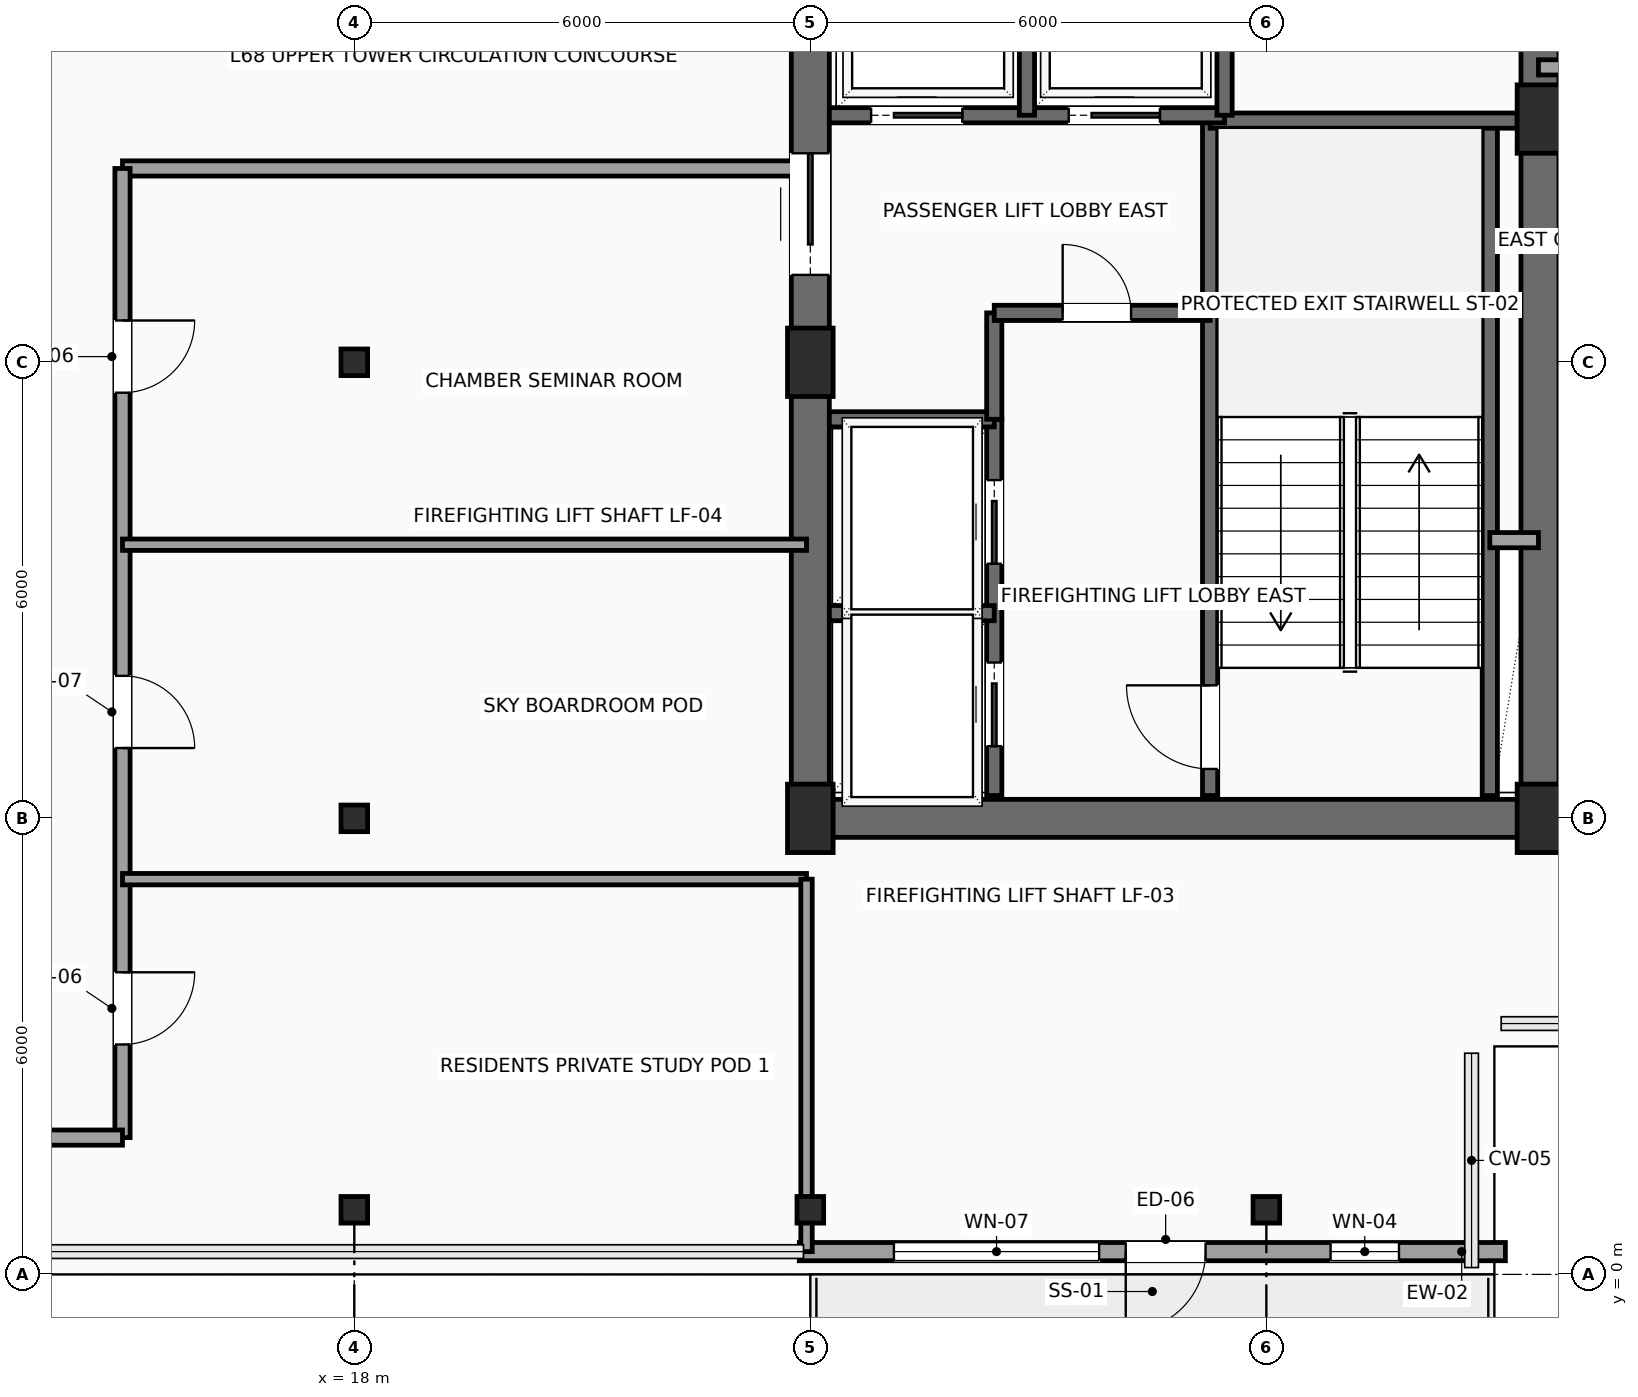
"""IFC4 building model, lengths in metres.
Left out: names, types, materials, properties, quantities, classifications, styles, units other than length and angle.
Written with IfcOpenShell. Run it as: python <this file> out.ifc"""

import sys

from ifc_helpers import new_model, si_unit, direction, frame, frame_2d, origin, origin_2d, place, context, subcontext, project, spatial, rectangle, hollow_rectangle, extrude, element, fill, save


model = new_model("IFC4")
c1 = context("Model", 3, precision=1e-05, world=origin(), true_north=direction((0.0, 1.0)))
c2 = subcontext(c1, "Body", "Model", "MODEL_VIEW")
j1 = project(units=[si_unit("LENGTHUNIT", "METRE"), si_unit("PLANEANGLEUNIT", "RADIAN")], contexts=[c1])
p1 = place(None, origin())
s1 = spatial("IfcSite", under=j1, at=p1, CompositionType="ELEMENT")
p2 = place(p1, origin())
s2 = spatial("IfcBuilding", under=s1, at=p2, CompositionType="ELEMENT")
p3 = place(p2, frame((0.0, 0.0, 271.2)))
s3 = spatial("IfcBuildingStorey", under=s2, at=p3, CompositionType="ELEMENT", Elevation=271.2)
for number, where, z_axis, x_axis in (
    (1, (24.0, 6.0, 0.0), (0.0, 0.0, 1.0), (1.0, 0.0, 0.0)),
    (2, (24.0, 12.0, 0.0), (0.0, 0.0, 1.0), (1.0, 0.0, 0.0)),
    (3, (33.6, 6.0, 0.0), (0.0, 0.0, 1.0), (1.0, 0.0, 0.0)),
    (4, (33.6, 15.2, 0.0), (0.0, 0.0, 1.0), (1.0, 0.0, 0.0)),
):
    element("IfcColumn", number, at=place(p3, frame(where, z_axis=z_axis, x_axis=x_axis)), inside=s3, PredefinedType="COLUMN", context=c2, shape_type="SweptSolid", body=[
        extrude(rectangle(XDim=0.6, YDim=0.9, at=origin_2d()), origin(), (0.0, 0.0, 1.0), 3.5),
    ])
for number, where, z_axis, x_axis in (
    (5, (18.0, 0.85, 0.0), (0.0, 0.0, 1.0), (1.0, 0.0, 0.0)),
    (6, (18.0, 6.0, 0.0), (0.0, 0.0, 1.0), (1.0, 0.0, 0.0)),
    (7, (18.0, 12.0, 0.0), (0.0, 0.0, 1.0), (1.0, 0.0, 0.0)),
    (8, (24.0, 0.85, 0.0), (0.0, 0.0, 1.0), (1.0, 0.0, 0.0)),
    (9, (30.0, 0.85, 0.0), (0.0, 0.0, 1.0), (1.0, 0.0, 0.0)),
):
    element("IfcColumn", number, at=place(p3, frame(where, z_axis=z_axis, x_axis=x_axis)), inside=s3, PredefinedType="COLUMN", context=c2, shape_type="SweptSolid", body=[
        extrude(hollow_rectangle(XDim=0.35, YDim=0.35, WallThickness=0.016, InnerFilletRadius=0.016, OuterFilletRadius=0.032, at=origin_2d()), origin(), (0.0, 0.0, 1.0), 3.5),
    ])
p4 = place(p3, frame((33.145, 0.3, 0.0), z_axis=(0.0, 0.0, 1.0), x_axis=(-1.0, 0.0, 0.0)))
e10 = element("IfcWall", 10, at=p4, inside=s3, PredefinedType="SOLIDWALL", context=c2, shape_type="SweptSolid", body=[
    extrude(rectangle(XDim=9.29, YDim=0.24, at=frame_2d((4.645, 0.0))), origin(), (0.0, 0.0, 1.0), 3.3),
])
p5 = place(p4, frame((3.945, 0.0, 0.0)))
e11 = element("IfcOpeningElement", 11, at=p5, cuts=e10, PredefinedType="OPENING", context=c2, shape_type="SweptSolid", body=[
    extrude(rectangle(XDim=1.05, YDim=2.2, at=frame_2d((0.525, 1.1))), frame((0.0, 0.13, 0.0), z_axis=(0.0, -1.0, 0.0), x_axis=(1.0, 0.0, 0.0)), (0.0, 0.0, 1.0), 0.26),
])
p6 = place(p4, frame((5.345, 0.0, 0.6)))
e12 = element("IfcOpeningElement", 12, at=p6, cuts=e10, PredefinedType="OPENING", context=c2, shape_type="SweptSolid", body=[
    extrude(rectangle(XDim=2.7, YDim=2.3, at=frame_2d((1.35, 1.15))), frame((0.0, 0.13, 0.0), z_axis=(0.0, -1.0, 0.0), x_axis=(1.0, 0.0, 0.0)), (0.0, 0.0, 1.0), 0.26),
])
p7 = place(p4, frame((1.4, 0.0, 0.6)))
e13 = element("IfcOpeningElement", 13, at=p7, cuts=e10, PredefinedType="OPENING", context=c2, shape_type="SweptSolid", body=[
    extrude(rectangle(XDim=0.9, YDim=2.2, at=frame_2d((0.45, 1.1))), frame((0.0, 0.13, 0.0), z_axis=(0.0, -1.0, 0.0), x_axis=(1.0, 0.0, 0.0)), (0.0, 0.0, 1.0), 0.26),
])
p8 = place(p3, frame((24.0, 6.0, 0.0), z_axis=(0.0, 0.0, 1.0), x_axis=(1.0, 0.0, 0.0)))
e14 = element("IfcWall", 14, at=p8, inside=s3, PredefinedType="SHEAR", context=c2, shape_type="SweptSolid", body=[
    extrude(rectangle(XDim=9.6, YDim=0.5, at=frame_2d((4.8, 0.0))), origin(), (0.0, 0.0, 1.0), 3.3),
])
p9 = place(p3, frame((24.0, 6.0, 0.0), z_axis=(0.0, 0.0, 1.0), x_axis=(0.0, 1.0, 0.0)))
e15 = element("IfcWall", 15, at=p9, inside=s3, PredefinedType="SHEAR", context=c2, shape_type="SweptSolid", body=[
    extrude(rectangle(XDim=12.0, YDim=0.5, at=frame_2d((6.0, 0.0))), origin(), (0.0, 0.0, 1.0), 3.3),
])
p10 = place(p9, frame((7.15, 0.0, 0.0)))
e16 = element("IfcOpeningElement", 16, at=p10, cuts=e15, PredefinedType="OPENING", context=c2, shape_type="SweptSolid", body=[
    extrude(rectangle(XDim=1.6, YDim=2.3, at=frame_2d((0.8, 1.15))), frame((0.0, 0.26, 0.0), z_axis=(0.0, -1.0, 0.0), x_axis=(1.0, 0.0, 0.0)), (0.0, 0.0, 1.0), 0.52),
])
p11 = place(p3, frame((33.6, 6.0, 0.0), z_axis=(0.0, 0.0, 1.0), x_axis=(0.0, 1.0, 0.0)))
e17 = element("IfcWall", 17, at=p11, inside=s3, PredefinedType="SHEAR", context=c2, shape_type="SweptSolid", body=[
    extrude(rectangle(XDim=12.0, YDim=0.5, at=frame_2d((6.0, 0.0))), origin(), (0.0, 0.0, 1.0), 3.3),
])
p12 = place(p11, frame((10.3, 0.0, 0.0)))
e18 = element("IfcOpeningElement", 18, at=p12, cuts=e17, PredefinedType="OPENING", context=c2, shape_type="SweptSolid", body=[
    extrude(rectangle(XDim=0.9, YDim=2.15, at=frame_2d((0.45, 1.075))), frame((0.0, 0.26, 0.0), z_axis=(0.0, -1.0, 0.0), x_axis=(1.0, 0.0, 0.0)), (0.0, 0.0, 1.0), 0.52),
])
p13 = place(p3, frame((29.26, 6.3, 0.0), z_axis=(0.0, 0.0, 1.0), x_axis=(0.0, 1.0, 0.0)))
e19 = element("IfcWall", 19, at=p13, inside=s3, PredefinedType="SHEAR", context=c2, shape_type="SweptSolid", body=[
    extrude(rectangle(XDim=8.88, YDim=0.2, at=frame_2d((4.44, 0.0))), origin(), (0.0, 0.0, 1.0), 3.3),
])
p14 = place(p13, frame((0.35, 0.0, 0.0)))
e20 = element("IfcOpeningElement", 20, at=p14, cuts=e19, PredefinedType="OPENING", context=c2, shape_type="SweptSolid", body=[
    extrude(rectangle(XDim=1.1, YDim=2.2, at=frame_2d((0.55, 1.1))), frame((0.0, 0.11, 0.0), z_axis=(0.0, -1.0, 0.0), x_axis=(1.0, 0.0, 0.0)), (0.0, 0.0, 1.0), 0.22),
])
p15 = place(p3, frame((32.94, 6.3, 0.0), z_axis=(0.0, 0.0, 1.0), x_axis=(0.0, 1.0, 0.0)))
e21 = element("IfcWall", 21, at=p15, inside=s3, PredefinedType="SHEAR", context=c2, shape_type="SweptSolid", body=[
    extrude(rectangle(XDim=8.88, YDim=0.2, at=frame_2d((4.44, 0.0))), origin(), (0.0, 0.0, 1.0), 3.3),
])
p16 = place(p3, frame((29.26, 15.18, 0.0), z_axis=(0.0, 0.0, 1.0), x_axis=(1.0, 0.0, 0.0)))
e22 = element("IfcWall", 22, at=p16, inside=s3, PredefinedType="SHEAR", context=c2, shape_type="SweptSolid", body=[
    extrude(rectangle(XDim=4.04, YDim=0.2, at=frame_2d((2.02, 0.0))), origin(), (0.0, 0.0, 1.0), 3.3),
])
p17 = place(p3, frame((26.42, 6.3, 0.0), z_axis=(0.0, 0.0, 1.0), x_axis=(0.0, 1.0, 0.0)))
e23 = element("IfcWall", 23, at=p17, inside=s3, PredefinedType="SHEAR", context=c2, shape_type="SweptSolid", body=[
    extrude(rectangle(XDim=4.95, YDim=0.2, at=frame_2d((2.475, 0.0))), origin(), (0.0, 0.0, 1.0), 3.3),
])
p18 = place(p17, frame((0.65, 0.0, 0.0)))
e24 = element("IfcOpeningElement", 24, at=p18, cuts=e23, PredefinedType="OPENING", context=c2, shape_type="SweptSolid", body=[
    extrude(rectangle(XDim=1.1, YDim=2.2, at=frame_2d((0.55, 1.1))), frame((0.0, 0.11, 0.0), z_axis=(0.0, -1.0, 0.0), x_axis=(1.0, 0.0, 0.0)), (0.0, 0.0, 1.0), 0.22),
])
p19 = place(p17, frame((3.05, 0.0, 0.0)))
e25 = element("IfcOpeningElement", 25, at=p19, cuts=e23, PredefinedType="OPENING", context=c2, shape_type="SweptSolid", body=[
    extrude(rectangle(XDim=1.1, YDim=2.2, at=frame_2d((0.55, 1.1))), frame((0.0, 0.11, 0.0), z_axis=(0.0, -1.0, 0.0), x_axis=(1.0, 0.0, 0.0)), (0.0, 0.0, 1.0), 0.22),
])
for number, where, z_axis, x_axis in (
    (26, (24.25, 8.7, 0.0), (0.0, 0.0, 1.0), (1.0, 0.0, 0.0)),
    (27, (24.25, 11.25, 0.0), (0.0, 0.0, 1.0), (1.0, 0.0, 0.0)),
):
    element("IfcWall", number, at=place(p3, frame(where, z_axis=z_axis, x_axis=x_axis)), inside=s3, PredefinedType="SHEAR", context=c2, shape_type="SweptSolid", body=[
        extrude(rectangle(XDim=2.17, YDim=0.2, at=frame_2d((1.085, 0.0))), origin(), (0.0, 0.0, 1.0), 3.3),
    ])
p20 = place(p3, frame((26.42, 11.25, 0.0), z_axis=(0.0, 0.0, 1.0), x_axis=(0.0, 1.0, 0.0)))
e28 = element("IfcWall", 28, at=p20, inside=s3, PredefinedType="SHEAR", context=c2, shape_type="SweptSolid", body=[
    extrude(rectangle(XDim=1.4, YDim=0.2, at=frame_2d((0.7, 0.0))), origin(), (0.0, 0.0, 1.0), 3.3),
])
p21 = place(p3, frame((26.42, 12.65, 0.0), z_axis=(0.0, 0.0, 1.0), x_axis=(1.0, 0.0, 0.0)))
e29 = element("IfcWall", 29, at=p21, inside=s3, PredefinedType="SHEAR", context=c2, shape_type="SweptSolid", body=[
    extrude(rectangle(XDim=2.84, YDim=0.2, at=frame_2d((1.42, 0.0))), origin(), (0.0, 0.0, 1.0), 3.3),
])
p22 = place(p21, frame((0.9, 0.0, 0.0)))
e30 = element("IfcOpeningElement", 30, at=p22, cuts=e29, PredefinedType="OPENING", context=c2, shape_type="SweptSolid", body=[
    extrude(rectangle(XDim=0.9, YDim=2.15, at=frame_2d((0.45, 1.075))), frame((0.0, 0.11, 0.0), z_axis=(0.0, -1.0, 0.0), x_axis=(1.0, 0.0, 0.0)), (0.0, 0.0, 1.0), 0.22),
])
p23 = place(p3, frame((32.94, 9.66, 0.0), z_axis=(0.0, 0.0, 1.0), x_axis=(1.0, 0.0, 0.0)))
e31 = element("IfcWall", 31, at=p23, inside=s3, PredefinedType="SOLIDWALL", context=c2, shape_type="SweptSolid", body=[
    extrude(rectangle(XDim=0.64, YDim=0.2, at=frame_2d((0.32, 0.0))), origin(), (0.0, 0.0, 1.0), 3.3),
])
p24 = place(p3, frame((24.25, 15.25, 0.0), z_axis=(0.0, 0.0, 1.0), x_axis=(1.0, 0.0, 0.0)))
e32 = element("IfcWall", 32, at=p24, inside=s3, PredefinedType="SHEAR", context=c2, shape_type="SweptSolid", body=[
    extrude(rectangle(XDim=5.2, YDim=0.2, at=frame_2d((2.6, 0.0))), origin(), (0.0, 0.0, 1.0), 3.3),
])
p25 = place(p24, frame((0.55, 0.0, 0.0)))
e33 = element("IfcOpeningElement", 33, at=p25, cuts=e32, PredefinedType="OPENING", context=c2, shape_type="SweptSolid", body=[
    extrude(rectangle(XDim=1.2, YDim=2.2, at=frame_2d((0.6, 1.1))), frame((0.0, 0.11, 0.0), z_axis=(0.0, -1.0, 0.0), x_axis=(1.0, 0.0, 0.0)), (0.0, 0.0, 1.0), 0.22),
])
p26 = place(p24, frame((3.15, 0.0, 0.0)))
e34 = element("IfcOpeningElement", 34, at=p26, cuts=e32, PredefinedType="OPENING", context=c2, shape_type="SweptSolid", body=[
    extrude(rectangle(XDim=1.2, YDim=2.2, at=frame_2d((0.6, 1.1))), frame((0.0, 0.11, 0.0), z_axis=(0.0, -1.0, 0.0), x_axis=(1.0, 0.0, 0.0)), (0.0, 0.0, 1.0), 0.22),
])
p27 = place(p3, frame((26.85, 15.25, 0.0), z_axis=(0.0, 0.0, 1.0), x_axis=(0.0, 1.0, 0.0)))
e35 = element("IfcWall", 35, at=p27, inside=s3, PredefinedType="SHEAR", context=c2, shape_type="SweptSolid", body=[
    extrude(rectangle(XDim=2.4, YDim=0.2, at=frame_2d((1.2, 0.0))), origin(), (0.0, 0.0, 1.0), 3.3),
])
p28 = place(p3, frame((29.45, 15.25, 0.0), z_axis=(0.0, 0.0, 1.0), x_axis=(0.0, 1.0, 0.0)))
e36 = element("IfcWall", 36, at=p28, inside=s3, PredefinedType="SHEAR", context=c2, shape_type="SweptSolid", body=[
    extrude(rectangle(XDim=2.45, YDim=0.2, at=frame_2d((1.225, 0.0))), origin(), (0.0, 0.0, 1.0), 3.3),
])
p29 = place(p3, frame((35.7, 15.88, 0.0), z_axis=(0.0, 0.0, 1.0), x_axis=(-1.0, 0.0, 0.0)))
e37 = element("IfcWall", 37, at=p29, inside=s3, PredefinedType="PARTITIONING", context=c2, shape_type="SweptSolid", body=[
    extrude(rectangle(XDim=2.12, YDim=0.2, at=frame_2d((1.06, 0.0))), origin(), (0.0, 0.0, 1.0), 3.3),
])
p30 = place(p3, frame((23.95, 14.55, 0.0), z_axis=(0.0, 0.0, 1.0), x_axis=(-1.0, 0.0, 0.0)))
e38 = element("IfcWall", 38, at=p30, inside=s3, PredefinedType="PARTITIONING", context=c2, shape_type="SweptSolid", body=[
    extrude(rectangle(XDim=9.0, YDim=0.2, at=frame_2d((4.5, 0.0))), origin(), (0.0, 0.0, 1.0), 3.3),
])
p31 = place(p3, frame((14.95, 14.55, 0.0), z_axis=(0.0, 0.0, 1.0), x_axis=(0.0, -1.0, 0.0)))
e39 = element("IfcWall", 39, at=p31, inside=s3, PredefinedType="PARTITIONING", context=c2, shape_type="SweptSolid", body=[
    extrude(rectangle(XDim=12.75, YDim=0.2, at=frame_2d((6.375, 0.0))), origin(), (0.0, 0.0, 1.0), 3.3),
])
p32 = place(p31, frame((10.575, 0.0, 0.0)))
e40 = element("IfcOpeningElement", 40, at=p32, cuts=e39, PredefinedType="OPENING", context=c2, shape_type="SweptSolid", body=[
    extrude(rectangle(XDim=0.95, YDim=2.15, at=frame_2d((0.475, 1.075))), frame((0.0, 0.11, 0.0), z_axis=(0.0, -1.0, 0.0), x_axis=(1.0, 0.0, 0.0)), (0.0, 0.0, 1.0), 0.22),
])
p33 = place(p31, frame((6.675, 0.0, 0.0)))
e41 = element("IfcOpeningElement", 41, at=p33, cuts=e39, PredefinedType="OPENING", context=c2, shape_type="SweptSolid", body=[
    extrude(rectangle(XDim=0.95, YDim=2.15, at=frame_2d((0.475, 1.075))), frame((0.0, 0.11, 0.0), z_axis=(0.0, -1.0, 0.0), x_axis=(1.0, 0.0, 0.0)), (0.0, 0.0, 1.0), 0.22),
])
p34 = place(p31, frame((2.0, 0.0, 0.0)))
e42 = element("IfcOpeningElement", 42, at=p34, cuts=e39, PredefinedType="OPENING", context=c2, shape_type="SweptSolid", body=[
    extrude(rectangle(XDim=0.95, YDim=2.15, at=frame_2d((0.475, 1.075))), frame((0.0, 0.11, 0.0), z_axis=(0.0, -1.0, 0.0), x_axis=(1.0, 0.0, 0.0)), (0.0, 0.0, 1.0), 0.22),
])
p35 = place(p3, frame((14.95, 1.8, 0.0), z_axis=(0.0, 0.0, 1.0), x_axis=(-1.0, 0.0, 0.0)))
e43 = element("IfcWall", 43, at=p35, inside=s3, PredefinedType="PARTITIONING", context=c2, shape_type="SweptSolid", body=[
    extrude(rectangle(XDim=2.35, YDim=0.2, at=frame_2d((1.175, 0.0))), origin(), (0.0, 0.0, 1.0), 3.3),
])
p36 = place(p3, frame((14.95, 5.2, 0.0), z_axis=(0.0, 0.0, 1.0), x_axis=(1.0, 0.0, 0.0)))
e44 = element("IfcWall", 44, at=p36, inside=s3, PredefinedType="PARTITIONING", context=c2, shape_type="SweptSolid", body=[
    extrude(rectangle(XDim=9.0, YDim=0.15, at=frame_2d((4.5, 0.0))), origin(), (0.0, 0.0, 1.0), 3.3),
])
p37 = place(p3, frame((23.95, 0.3, 0.0), z_axis=(0.0, 0.0, 1.0), x_axis=(0.0, 1.0, 0.0)))
e45 = element("IfcWall", 45, at=p37, inside=s3, PredefinedType="PARTITIONING", context=c2, shape_type="SweptSolid", body=[
    extrude(rectangle(XDim=4.9, YDim=0.15, at=frame_2d((2.45, 0.0))), origin(), (0.0, 0.0, 1.0), 2.967),
])
p38 = place(p3, frame((14.95, 9.6, 0.0), z_axis=(0.0, 0.0, 1.0), x_axis=(1.0, 0.0, 0.0)))
e46 = element("IfcWall", 46, at=p38, inside=s3, PredefinedType="PARTITIONING", context=c2, shape_type="SweptSolid", body=[
    extrude(rectangle(XDim=9.0, YDim=0.15, at=frame_2d((4.5, 0.0))), origin(), (0.0, 0.0, 1.0), 3.3),
])
p39 = place(p5, origin())
e47 = element("IfcDoor", 47, at=p39, inside=s3, OperationType="SINGLE_SWING_RIGHT", PredefinedType="DOOR", context=c2, shape_type="SweptSolid", body=[
    extrude(rectangle(XDim=1.05, YDim=2.2, at=frame_2d((0.525, 1.1))), frame((0.0, 0.025, 0.0), z_axis=(0.0, -1.0, 0.0), x_axis=(1.0, 0.0, 0.0)), (0.0, 0.0, 1.0), 0.05),
])
fill(e11, e47)
p40 = place(p6, origin())
e48 = element("IfcWindow", 48, at=p40, inside=s3, PartitioningType="SINGLE_PANEL", PredefinedType="WINDOW", context=c2, shape_type="SweptSolid", body=[
    extrude(rectangle(XDim=2.7, YDim=2.3, at=frame_2d((1.35, 1.15))), frame((0.0, 0.03, 0.0), z_axis=(0.0, -1.0, 0.0), x_axis=(1.0, 0.0, 0.0)), (0.0, 0.0, 1.0), 0.06),
])
fill(e12, e48)
p41 = place(p7, origin())
e49 = element("IfcWindow", 49, at=p41, inside=s3, PartitioningType="SINGLE_PANEL", PredefinedType="WINDOW", context=c2, shape_type="SweptSolid", body=[
    extrude(rectangle(XDim=0.9, YDim=2.2, at=frame_2d((0.45, 1.1))), frame((0.0, 0.03, 0.0), z_axis=(0.0, -1.0, 0.0), x_axis=(1.0, 0.0, 0.0)), (0.0, 0.0, 1.0), 0.06),
])
fill(e13, e49)
p42 = place(p10, origin())
e50 = element("IfcDoor", 50, at=p42, inside=s3, OperationType="DOUBLE_DOOR_SLIDING", PredefinedType="DOOR", context=c2, shape_type="SweptSolid", body=[
    extrude(rectangle(XDim=1.6, YDim=2.3, at=frame_2d((0.8, 1.15))), frame((0.0, 0.025, 0.0), z_axis=(0.0, -1.0, 0.0), x_axis=(1.0, 0.0, 0.0)), (0.0, 0.0, 1.0), 0.05),
])
fill(e16, e50)
p43 = place(p14, origin())
e51 = element("IfcDoor", 51, at=p43, inside=s3, OperationType="SINGLE_SWING_RIGHT", PredefinedType="DOOR", context=c2, shape_type="SweptSolid", body=[
    extrude(rectangle(XDim=1.1, YDim=2.2, at=frame_2d((0.55, 1.1))), frame((0.0, 0.025, 0.0), z_axis=(0.0, -1.0, 0.0), x_axis=(1.0, 0.0, 0.0)), (0.0, 0.0, 1.0), 0.05),
])
fill(e20, e51)
p44 = place(p18, origin())
e52 = element("IfcDoor", 52, at=p44, inside=s3, OperationType="SLIDING_TO_LEFT", PredefinedType="DOOR", context=c2, shape_type="SweptSolid", body=[
    extrude(rectangle(XDim=1.1, YDim=2.2, at=frame_2d((0.55, 1.1))), frame((0.0, 0.025, 0.0), z_axis=(0.0, -1.0, 0.0), x_axis=(1.0, 0.0, 0.0)), (0.0, 0.0, 1.0), 0.05),
])
fill(e24, e52)
p45 = place(p19, origin())
e53 = element("IfcDoor", 53, at=p45, inside=s3, OperationType="SLIDING_TO_LEFT", PredefinedType="DOOR", context=c2, shape_type="SweptSolid", body=[
    extrude(rectangle(XDim=1.1, YDim=2.2, at=frame_2d((0.55, 1.1))), frame((0.0, 0.025, 0.0), z_axis=(0.0, -1.0, 0.0), x_axis=(1.0, 0.0, 0.0)), (0.0, 0.0, 1.0), 0.05),
])
fill(e25, e53)
p46 = place(p22, origin())
e54 = element("IfcDoor", 54, at=p46, inside=s3, OperationType="SINGLE_SWING_LEFT", PredefinedType="DOOR", context=c2, shape_type="SweptSolid", body=[
    extrude(rectangle(XDim=0.9, YDim=2.15, at=frame_2d((0.45, 1.075))), frame((0.0, 0.025, 0.0), z_axis=(0.0, -1.0, 0.0), x_axis=(1.0, 0.0, 0.0)), (0.0, 0.0, 1.0), 0.05),
])
fill(e30, e54)
p47 = place(p25, origin())
e55 = element("IfcDoor", 55, at=p47, inside=s3, OperationType="SLIDING_TO_RIGHT", PredefinedType="DOOR", context=c2, shape_type="SweptSolid", body=[
    extrude(rectangle(XDim=1.2, YDim=2.2, at=frame_2d((0.6, 1.1))), frame((0.0, 0.025, 0.0), z_axis=(0.0, -1.0, 0.0), x_axis=(1.0, 0.0, 0.0)), (0.0, 0.0, 1.0), 0.05),
])
fill(e33, e55)
p48 = place(p26, origin())
e56 = element("IfcDoor", 56, at=p48, inside=s3, OperationType="SLIDING_TO_RIGHT", PredefinedType="DOOR", context=c2, shape_type="SweptSolid", body=[
    extrude(rectangle(XDim=1.2, YDim=2.2, at=frame_2d((0.6, 1.1))), frame((0.0, 0.025, 0.0), z_axis=(0.0, -1.0, 0.0), x_axis=(1.0, 0.0, 0.0)), (0.0, 0.0, 1.0), 0.05),
])
fill(e34, e56)
p49 = place(p32, origin())
e57 = element("IfcDoor", 57, at=p49, inside=s3, OperationType="SINGLE_SWING_LEFT", PredefinedType="DOOR", context=c2, shape_type="SweptSolid", body=[
    extrude(rectangle(XDim=0.95, YDim=2.15, at=frame_2d((0.475, 1.075))), frame((0.0, 0.025, 0.0), z_axis=(0.0, -1.0, 0.0), x_axis=(1.0, 0.0, 0.0)), (0.0, 0.0, 1.0), 0.05),
])
fill(e40, e57)
p50 = place(p33, origin())
e58 = element("IfcDoor", 58, at=p50, inside=s3, OperationType="SINGLE_SWING_RIGHT", PredefinedType="DOOR", context=c2, shape_type="SweptSolid", body=[
    extrude(rectangle(XDim=0.95, YDim=2.15, at=frame_2d((0.475, 1.075))), frame((0.0, 0.025, 0.0), z_axis=(0.0, -1.0, 0.0), x_axis=(1.0, 0.0, 0.0)), (0.0, 0.0, 1.0), 0.05),
])
fill(e41, e58)
p51 = place(p34, origin())
e59 = element("IfcDoor", 59, at=p51, inside=s3, OperationType="SINGLE_SWING_LEFT", PredefinedType="DOOR", context=c2, shape_type="SweptSolid", body=[
    extrude(rectangle(XDim=0.95, YDim=2.15, at=frame_2d((0.475, 1.075))), frame((0.0, 0.025, 0.0), z_axis=(0.0, -1.0, 0.0), x_axis=(1.0, 0.0, 0.0)), (0.0, 0.0, 1.0), 0.05),
])
fill(e42, e59)
save(model, sys.argv[1])
